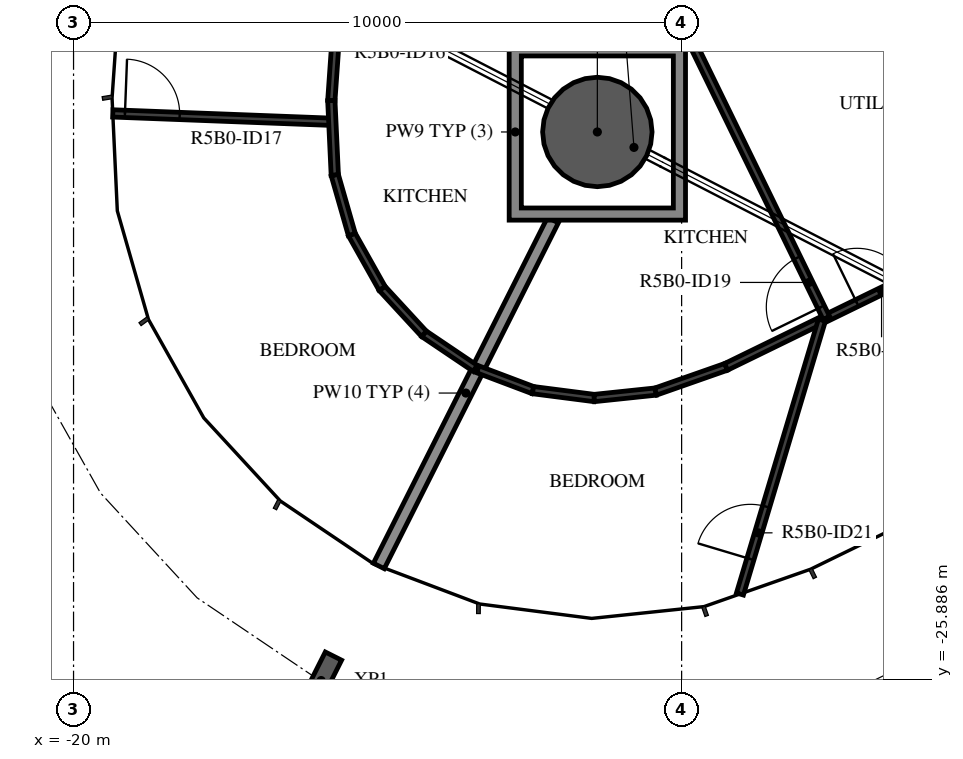
"""IFC4 building model, lengths in metres.
Left out: names, types, materials, properties, quantities, classifications, styles, units other than length and angle.
Written with IfcOpenShell. Run it as: python <this file> out.ifc"""

import sys

from ifc_helpers import new_model, si_unit, direction, frame, frame_2d, origin, origin_2d, place, context, subcontext, project, spatial, polyline, rectangle, hollow_circle, i_section, outline, extrude, element, fill, save


model = new_model("IFC4")
c1 = context("Model", 3, precision=1e-05, world=origin(), true_north=direction((0.0, 1.0)))
c2 = subcontext(c1, "Body", "Model", "MODEL_VIEW")
j1 = project(units=[si_unit("LENGTHUNIT", "METRE"), si_unit("PLANEANGLEUNIT", "RADIAN")], contexts=[c1])
p1 = place(None, origin())
s1 = spatial("IfcSite", under=j1, at=p1, CompositionType="ELEMENT")
p2 = place(p1, origin())
s2 = spatial("IfcBuilding", under=s1, at=p2, CompositionType="ELEMENT")
p3 = place(p2, frame((0.0, 0.0, 202.4)))
s3 = spatial("IfcBuildingStorey", under=s2, at=p3, CompositionType="ELEMENT", Elevation=202.4)
p4 = place(p3, frame((-11.386, -16.881, -0.38), z_axis=(0.0, 0.0, 1.0), x_axis=(1.0, 0.0, 0.0)))
e1 = element("IfcColumn", 1, at=p4, inside=s3, PredefinedType="COLUMN", context=c2, shape_type="SweptSolid", body=[
    extrude(hollow_circle(Radius=0.9, WallThickness=0.04, at=origin_2d()), origin(), (0.0, 0.0, 1.0), 3.5),
])
p5 = place(p3, frame((-15.928, -25.902, -0.38), z_axis=(0.0, 0.0, 1.0), x_axis=(-0.893169071277, 0.449721035881, 0.0)))
e2 = element("IfcColumn", 2, at=p5, inside=s3, PredefinedType="COLUMN", context=c2, shape_type="SweptSolid", body=[
    extrude(i_section(OverallWidth=0.3, OverallDepth=0.9, WebThickness=0.019, FlangeThickness=0.035, FilletRadius=0.03, at=origin_2d()), origin(), (0.0, 0.0, 1.0), 3.5),
])
p6 = place(p3, frame((-14.979, -24.017, 0.0), z_axis=(0.0, 0.0, 1.0), x_axis=(0.449711952388, 0.893173644864, 0.0)))
e3 = element("IfcWall", 3, at=p6, inside=s3, PredefinedType="STANDARD", context=c2, shape_type="SweptSolid", body=[
    extrude(rectangle(XDim=6.367, YDim=0.2, at=frame_2d((3.184, 0.0))), origin(), (0.0, 0.0, 1.0), 2.73),
])
p7 = place(p3, frame((-14.931, -4.5, 0.0), z_axis=(0.0, 0.0, 1.0), x_axis=(-0.069751708439, -0.997564383471, 0.0)))
e4 = element("IfcWall", 4, at=p7, inside=s3, PredefinedType="PARTITIONING", context=c2, shape_type="SweptSolid", body=[
    extrude(rectangle(XDim=11.894, YDim=0.12, at=frame_2d((5.947, 0.0))), origin(), (0.0, 0.0, 1.0), 3.12),
])
p8 = place(p7, frame((5.4, 0.0, 0.0)))
e5 = element("IfcOpeningElement", 5, at=p8, cuts=e4, PredefinedType="OPENING", context=c2, shape_type="SweptSolid", body=[
    extrude(rectangle(XDim=0.9, YDim=2.1, at=frame_2d((0.45, 1.05))), frame((0.0, 0.07, 0.0), z_axis=(0.0, -1.0, 0.0), x_axis=(1.0, 0.0, 0.0)), (0.0, 0.0, 1.0), 0.14),
])
p9 = place(p3, frame((-19.355, -16.575, 0.0), z_axis=(0.0, 0.0, 1.0), x_axis=(0.999268343647, -0.038246272823, 0.0)))
e6 = element("IfcWall", 6, at=p9, inside=s3, PredefinedType="PARTITIONING", context=c2, shape_type="SweptSolid", body=[
    extrude(rectangle(XDim=3.613, YDim=0.12, at=frame_2d((1.807, 0.0))), origin(), (0.0, 0.0, 1.0), 3.12),
])
p10 = place(p9, frame((0.2, 0.0, 0.0)))
e7 = element("IfcOpeningElement", 7, at=p10, cuts=e6, PredefinedType="OPENING", context=c2, shape_type="SweptSolid", body=[
    extrude(rectangle(XDim=0.9, YDim=2.1, at=frame_2d((0.45, 1.05))), frame((0.0, 0.07, 0.0), z_axis=(0.0, -1.0, 0.0), x_axis=(1.0, 0.0, 0.0)), (0.0, 0.0, 1.0), 0.14),
])
p11 = place(p3, frame((-15.704, -17.59, 0.0), z_axis=(0.0, 0.0, 1.0), x_axis=(-0.046364428258, 0.998924591645, 0.0)))
e8 = element("IfcWall", 8, at=p11, inside=s3, PredefinedType="PARTITIONING", context=c2, shape_type="SweptSolid", body=[
    extrude(rectangle(XDim=1.227, YDim=0.12, at=frame_2d((0.613, 0.0))), origin(), (0.0, 0.0, 1.0), 3.12),
])
for number, where, z_axis, x_axis in (
    (9, (-13.395, -20.767, 0.0), (0.0, 0.0, 1.0), (-0.829, 0.559, 0.0)),
    (10, (-14.237, -20.199, 0.0), (0.0, 0.0, 1.0), (-0.678, 0.735, 0.0)),
):
    element("IfcWall", number, at=place(p3, frame(where, z_axis=z_axis, x_axis=x_axis)), inside=s3, PredefinedType="PARTITIONING", context=c2, shape_type="SweptSolid", body=[
        extrude(rectangle(XDim=1.016, YDim=0.12, at=frame_2d((0.508, 0.0))), origin(), (0.0, 0.0, 1.0), 3.12),
    ])
p12 = place(p3, frame((-14.926, -19.452, 0.0), z_axis=(0.0, 0.0, 1.0), x_axis=(-0.489941776958, 0.871755157823, 0.0)))
e11 = element("IfcWall", 11, at=p12, inside=s3, PredefinedType="PARTITIONING", context=c2, shape_type="SweptSolid", body=[
    extrude(rectangle(XDim=1.016, YDim=0.12, at=frame_2d((0.508, 0.0))), origin(), (0.0, 0.0, 1.0), 3.12),
])
p13 = place(p3, frame((-15.424, -18.567, 0.0), z_axis=(0.0, 0.0, 1.0), x_axis=(-0.275641454312, 0.961260520704, 0.0)))
e12 = element("IfcWall", 12, at=p13, inside=s3, PredefinedType="PARTITIONING", context=c2, shape_type="SweptSolid", body=[
    extrude(rectangle(XDim=1.016, YDim=0.12, at=frame_2d((0.508, 0.0))), origin(), (0.0, 0.0, 1.0), 3.12),
])
p14 = place(p3, frame((-13.351, -20.784, 0.0), z_axis=(0.0, 0.0, 1.0), x_axis=(0.935644105077, -0.352944908781, 0.0)))
e13 = element("IfcWall", 13, at=p14, inside=s3, PredefinedType="PARTITIONING", context=c2, shape_type="SweptSolid", body=[
    extrude(rectangle(XDim=0.969, YDim=0.12, at=frame_2d((0.484, 0.0))), origin(), (0.0, 0.0, 1.0), 3.12),
])
p15 = place(p3, frame((-12.445, -21.126, 0.0), z_axis=(0.0, 0.0, 1.0), x_axis=(0.991824046735, -0.127612931625, 0.0)))
e14 = element("IfcWall", 14, at=p15, inside=s3, PredefinedType="PARTITIONING", context=c2, shape_type="SweptSolid", body=[
    extrude(rectangle(XDim=1.016, YDim=0.12, at=frame_2d((0.508, 0.0))), origin(), (0.0, 0.0, 1.0), 3.12),
])
p16 = place(p3, frame((-11.437, -21.256, 0.0), z_axis=(0.0, 0.0, 1.0), x_axis=(0.994522555527, 0.104522182086, 0.0)))
e15 = element("IfcWall", 15, at=p16, inside=s3, PredefinedType="PARTITIONING", context=c2, shape_type="SweptSolid", body=[
    extrude(rectangle(XDim=1.016, YDim=0.12, at=frame_2d((0.508, 0.0))), origin(), (0.0, 0.0, 1.0), 3.12),
])
p17 = place(p3, frame((-10.427, -21.149, 0.0), z_axis=(0.0, 0.0, 1.0), x_axis=(0.943591256744, 0.331112579338, 0.0)))
e16 = element("IfcWall", 16, at=p17, inside=s3, PredefinedType="PARTITIONING", context=c2, shape_type="SweptSolid", body=[
    extrude(rectangle(XDim=1.227, YDim=0.12, at=frame_2d((0.613, 0.0))), origin(), (0.0, 0.0, 1.0), 3.12),
])
p18 = place(p3, frame((-9.269, -20.743, 0.0), z_axis=(0.0, 0.0, 1.0), x_axis=(0.898796865831, 0.438365365846, 0.0)))
e17 = element("IfcWall", 17, at=p18, inside=s3, PredefinedType="PARTITIONING", context=c2, shape_type="SweptSolid", body=[
    extrude(rectangle(XDim=12.879, YDim=0.12, at=frame_2d((6.439, 0.0))), origin(), (0.0, 0.0, 1.0), 3.12),
])
p19 = place(p18, frame((2.395, 0.0, 0.0)))
e18 = element("IfcOpeningElement", 18, at=p19, cuts=e17, PredefinedType="OPENING", context=c2, shape_type="SweptSolid", body=[
    extrude(rectangle(XDim=0.9, YDim=2.1, at=frame_2d((0.45, 1.05))), frame((0.0, 0.07, 0.0), z_axis=(0.0, -1.0, 0.0), x_axis=(1.0, 0.0, 0.0)), (0.0, 0.0, 1.0), 0.14),
])
p20 = place(p3, frame((-7.62, -19.939, 0.0), z_axis=(0.0, 0.0, 1.0), x_axis=(-0.438353807908, 0.89880250283, 0.0)))
e19 = element("IfcWall", 19, at=p20, inside=s3, PredefinedType="PARTITIONING", context=c2, shape_type="SweptSolid", body=[
    extrude(rectangle(XDim=5.58, YDim=0.12, at=frame_2d((2.79, 0.0))), origin(), (0.0, 0.0, 1.0), 3.12),
])
p21 = place(p20, frame((0.2, 0.0, 0.0)))
e20 = element("IfcOpeningElement", 20, at=p21, cuts=e19, PredefinedType="OPENING", context=c2, shape_type="SweptSolid", body=[
    extrude(rectangle(XDim=0.9, YDim=2.1, at=frame_2d((0.45, 1.05))), frame((0.0, 0.07, 0.0), z_axis=(0.0, -1.0, 0.0), x_axis=(1.0, 0.0, 0.0)), (0.0, 0.0, 1.0), 0.14),
])
p22 = place(p3, frame((-9.041, -24.479, 0.0), z_axis=(0.0, 0.0, 1.0), x_axis=(0.286804727102, 0.957989064923, 0.0)))
e21 = element("IfcWall", 21, at=p22, inside=s3, PredefinedType="PARTITIONING", context=c2, shape_type="SweptSolid", body=[
    extrude(rectangle(XDim=4.701, YDim=0.12, at=frame_2d((2.351, 0.0))), origin(), (0.0, 0.0, 1.0), 3.12),
])
p23 = place(p22, frame((0.6, 0.0, 0.0)))
e22 = element("IfcOpeningElement", 22, at=p23, cuts=e21, PredefinedType="OPENING", context=c2, shape_type="SweptSolid", body=[
    extrude(rectangle(XDim=0.9, YDim=2.1, at=frame_2d((0.45, 1.05))), frame((0.0, 0.07, 0.0), z_axis=(0.0, -1.0, 0.0), x_axis=(1.0, 0.0, 0.0)), (0.0, 0.0, 1.0), 0.14),
])
p24 = place(p3, origin())
e23 = element("IfcWall", 23, at=p24, inside=s3, PredefinedType="STANDARD", context=c2, shape_type="SweptSolid", body=[
    extrude(outline(polyline([(-9.936, -15.43), (-9.936, -18.331), (-12.836, -18.331), (-12.836, -15.43), (-9.936, -15.43)]), holes=[polyline([(-12.636, -18.131), (-10.136, -18.131), (-10.136, -15.631), (-12.636, -15.631), (-12.636, -18.131)])]), origin(), (0.0, 0.0, 1.0), 3.12),
])
p25 = place(p10, origin())
e24 = element("IfcDoor", 24, at=p25, inside=s3, OperationType="SINGLE_SWING_RIGHT", PredefinedType="DOOR", context=c2, shape_type="SweptSolid", body=[
    extrude(rectangle(XDim=0.9, YDim=2.1, at=frame_2d((0.45, 1.05))), frame((0.0, 0.025, 0.0), z_axis=(0.0, -1.0, 0.0), x_axis=(1.0, 0.0, 0.0)), (0.0, 0.0, 1.0), 0.05),
])
fill(e7, e24)
p26 = place(p21, origin())
e25 = element("IfcDoor", 25, at=p26, inside=s3, OperationType="SINGLE_SWING_LEFT", PredefinedType="DOOR", context=c2, shape_type="SweptSolid", body=[
    extrude(rectangle(XDim=0.9, YDim=2.1, at=frame_2d((0.45, 1.05))), frame((0.0, 0.025, 0.0), z_axis=(0.0, -1.0, 0.0), x_axis=(1.0, 0.0, 0.0)), (0.0, 0.0, 1.0), 0.05),
])
fill(e20, e25)
p27 = place(p19, origin())
e26 = element("IfcDoor", 26, at=p27, inside=s3, OperationType="SINGLE_SWING_LEFT", PredefinedType="DOOR", context=c2, shape_type="SweptSolid", body=[
    extrude(rectangle(XDim=0.9, YDim=2.1, at=frame_2d((0.45, 1.05))), frame((0.0, 0.025, 0.0), z_axis=(0.0, -1.0, 0.0), x_axis=(1.0, 0.0, 0.0)), (0.0, 0.0, 1.0), 0.05),
])
fill(e18, e26)
p28 = place(p23, origin())
e27 = element("IfcDoor", 27, at=p28, inside=s3, OperationType="SINGLE_SWING_LEFT", PredefinedType="DOOR", context=c2, shape_type="SweptSolid", body=[
    extrude(rectangle(XDim=0.9, YDim=2.1, at=frame_2d((0.45, 1.05))), frame((0.0, 0.025, 0.0), z_axis=(0.0, -1.0, 0.0), x_axis=(1.0, 0.0, 0.0)), (0.0, 0.0, 1.0), 0.05),
])
fill(e22, e27)
save(model, sys.argv[1])
